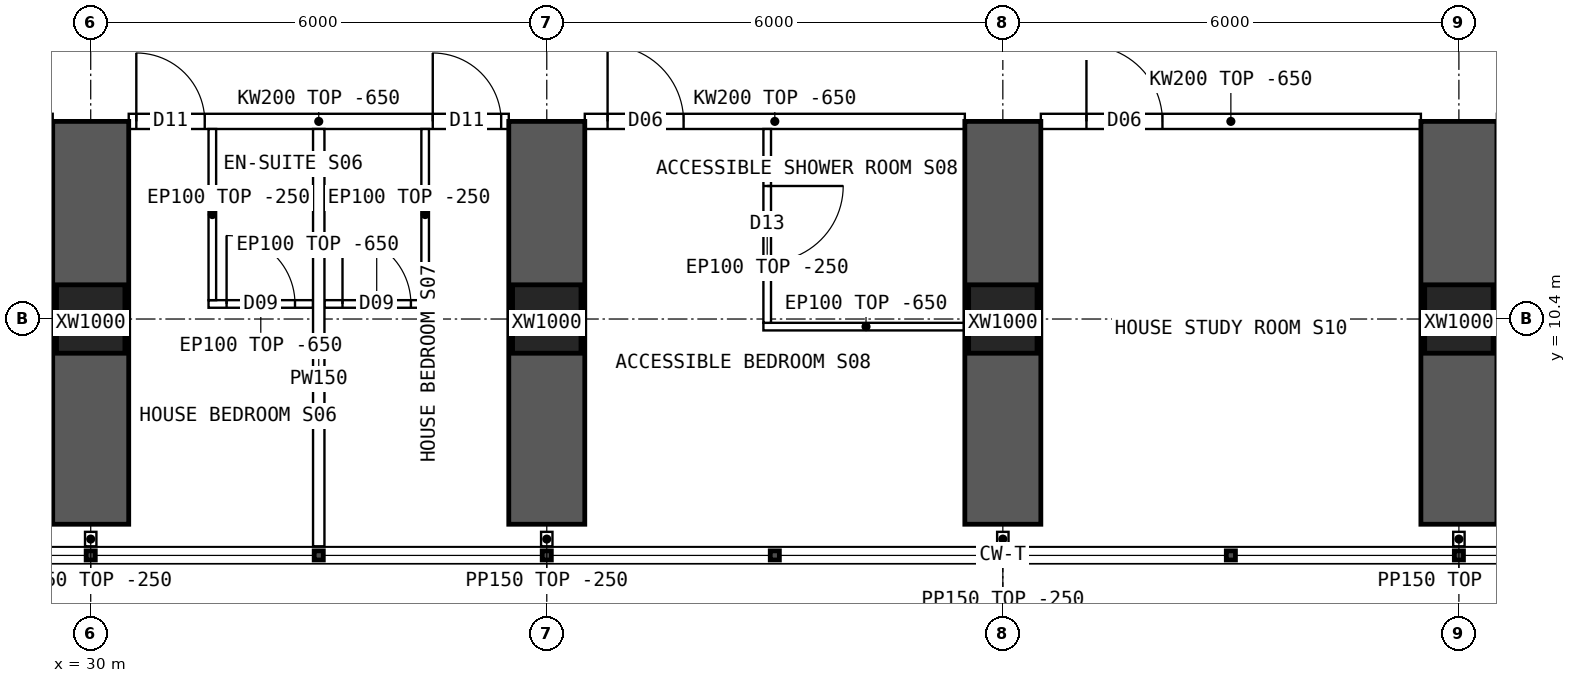
"""IFC4 building model, lengths in metres.
Left out: names, types, materials, properties, quantities, classifications, styles, units other than length and angle.
Written with IfcOpenShell. Run it as: python <this file> out.ifc"""

import sys

from ifc_helpers import new_model, si_unit, direction, frame, frame_2d, origin, origin_2d, place, context, subcontext, project, spatial, polyline, rectangle, hollow_rectangle, outline, extrude, element, fill, save


model = new_model("IFC4")
c1 = context("Model", 3, precision=1e-05, world=origin(), true_north=direction((0.0, 1.0)))
c2 = subcontext(c1, "Body", "Model", "MODEL_VIEW")
j1 = project(units=[si_unit("LENGTHUNIT", "METRE"), si_unit("PLANEANGLEUNIT", "RADIAN")], contexts=[c1])
p1 = place(None, origin())
s1 = spatial("IfcSite", under=j1, at=p1, CompositionType="ELEMENT")
p2 = place(p1, origin())
s2 = spatial("IfcBuilding", under=s1, at=p2, CompositionType="ELEMENT")
p3 = place(p2, frame((0.0, 0.0, 31.45)))
s3 = spatial("IfcBuildingStorey", under=s2, at=p3, CompositionType="ELEMENT", Elevation=31.45)
for number, where, z_axis, x_axis in (
    (1, (30.0, 10.4, 0.0), (0.0, 0.0, 1.0), (1.0, 0.0, 0.0)),
    (2, (36.0, 10.4, 0.0), (0.0, 0.0, 1.0), (1.0, 0.0, 0.0)),
    (3, (42.0, 10.4, 0.0), (0.0, 0.0, 1.0), (1.0, 0.0, 0.0)),
    (4, (48.0, 10.4, 0.0), (0.0, 0.0, 1.0), (1.0, 0.0, 0.0)),
):
    element("IfcColumn", number, at=place(p3, frame(where, z_axis=z_axis, x_axis=x_axis)), inside=s3, PredefinedType="COLUMN", context=c2, shape_type="SweptSolid", body=[
        extrude(hollow_rectangle(XDim=0.9, YDim=0.9, WallThickness=0.09, at=origin_2d()), origin(), (0.0, 0.0, 1.0), 3.75),
    ])
for number, where, z_axis, x_axis in (
    (5, (30.0, 7.7, 0.0), (0.0, 0.0, 1.0), (0.0, 1.0, 0.0)),
    (6, (36.0, 7.7, 0.0), (0.0, 0.0, 1.0), (0.0, 1.0, 0.0)),
    (7, (42.0, 7.7, 0.0), (0.0, 0.0, 1.0), (0.0, 1.0, 0.0)),
    (8, (48.0, 7.7, 0.0), (0.0, 0.0, 1.0), (0.0, 1.0, 0.0)),
):
    element("IfcWall", number, at=place(p3, frame(where, z_axis=z_axis, x_axis=x_axis)), inside=s3, PredefinedType="SHEAR", context=c2, shape_type="SweptSolid", body=[
        extrude(rectangle(XDim=5.3, YDim=1.0, at=frame_2d((2.65, 0.0))), origin(), (0.0, 0.0, 1.0), 3.75),
    ])
p4 = place(p3, frame((30.5, 13.0, 0.0), z_axis=(0.0, 0.0, 1.0), x_axis=(1.0, 0.0, 0.0)))
e9 = element("IfcWall", 9, at=p4, inside=s3, PredefinedType="SOLIDWALL", context=c2, shape_type="SweptSolid", body=[
    extrude(outline(polyline([(0.0, 0.0), (5.0, 0.0), (5.0, 3.1), (0.0, 3.1), (0.0, 0.0)])), frame((0.0, 0.1, 0.0), z_axis=(0.0, -1.0, 0.0), x_axis=(1.0, 0.0, 0.0)), (0.0, 0.0, 1.0), 0.2),
])
p5 = place(p4, frame((0.1, 0.0, 0.0)))
e10 = element("IfcOpeningElement", 10, at=p5, cuts=e9, PredefinedType="OPENING", context=c2, shape_type="SweptSolid", body=[
    extrude(rectangle(XDim=0.9, YDim=2.1, at=frame_2d((0.45, 1.05))), frame((0.0, 0.11, 0.0), z_axis=(0.0, -1.0, 0.0), x_axis=(1.0, 0.0, 0.0)), (0.0, 0.0, 1.0), 0.22),
])
p6 = place(p4, frame((4.0, 0.0, 0.0)))
e11 = element("IfcOpeningElement", 11, at=p6, cuts=e9, PredefinedType="OPENING", context=c2, shape_type="SweptSolid", body=[
    extrude(rectangle(XDim=0.9, YDim=2.1, at=frame_2d((0.45, 1.05))), frame((0.0, 0.11, 0.0), z_axis=(0.0, -1.0, 0.0), x_axis=(1.0, 0.0, 0.0)), (0.0, 0.0, 1.0), 0.22),
])
p7 = place(p3, frame((36.5, 13.0, 0.0), z_axis=(0.0, 0.0, 1.0), x_axis=(1.0, 0.0, 0.0)))
e12 = element("IfcWall", 12, at=p7, inside=s3, PredefinedType="SOLIDWALL", context=c2, shape_type="SweptSolid", body=[
    extrude(outline(polyline([(0.0, 0.0), (5.0, 0.0), (5.0, 3.1), (0.0, 3.1), (0.0, 0.0)])), frame((0.0, 0.1, 0.0), z_axis=(0.0, -1.0, 0.0), x_axis=(1.0, 0.0, 0.0)), (0.0, 0.0, 1.0), 0.2),
])
p8 = place(p7, frame((0.3, 0.0, 0.0)))
e13 = element("IfcOpeningElement", 13, at=p8, cuts=e12, PredefinedType="OPENING", context=c2, shape_type="SweptSolid", body=[
    extrude(rectangle(XDim=1.0, YDim=2.1, at=frame_2d((0.5, 1.05))), frame((0.0, 0.11, 0.0), z_axis=(0.0, -1.0, 0.0), x_axis=(1.0, 0.0, 0.0)), (0.0, 0.0, 1.0), 0.22),
])
p9 = place(p3, frame((42.5, 13.0, 0.0), z_axis=(0.0, 0.0, 1.0), x_axis=(1.0, 0.0, 0.0)))
e14 = element("IfcWall", 14, at=p9, inside=s3, PredefinedType="SOLIDWALL", context=c2, shape_type="SweptSolid", body=[
    extrude(outline(polyline([(0.0, 0.0), (5.0, 0.0), (5.0, 3.1), (0.0, 3.1), (0.0, 0.0)])), frame((0.0, 0.1, 0.0), z_axis=(0.0, -1.0, 0.0), x_axis=(1.0, 0.0, 0.0)), (0.0, 0.0, 1.0), 0.2),
])
p10 = place(p9, frame((0.6, 0.0, 0.0)))
e15 = element("IfcOpeningElement", 15, at=p10, cuts=e14, PredefinedType="OPENING", context=c2, shape_type="SweptSolid", body=[
    extrude(rectangle(XDim=1.0, YDim=2.1, at=frame_2d((0.5, 1.05))), frame((0.0, 0.11, 0.0), z_axis=(0.0, -1.0, 0.0), x_axis=(1.0, 0.0, 0.0)), (0.0, 0.0, 1.0), 0.22),
])
p11 = place(p3, frame((33.0, 7.41, 0.0), z_axis=(0.0, 0.0, 1.0), x_axis=(0.0, 1.0, 0.0)))
e16 = element("IfcWall", 16, at=p11, inside=s3, PredefinedType="PARTITIONING", context=c2, shape_type="SweptSolid", body=[
    extrude(outline(polyline([(0.0, 0.0), (5.49, 0.0), (5.49, 3.1), (5.442, 3.1), (5.44, 3.5), (3.192, 3.5), (3.19, 3.1), (2.792, 3.1), (2.79, 3.5), (0.0, 3.5), (0.0, 0.0)])), frame((0.0, 0.075, 0.0), z_axis=(0.0, -1.0, 0.0), x_axis=(1.0, 0.0, 0.0)), (0.0, 0.0, 1.0), 0.15),
])
p12 = place(p3, frame((32.925, 10.598, 0.0), z_axis=(0.0, 0.0, 1.0), x_axis=(-1.0, 0.0, 0.0)))
e17 = element("IfcWall", 17, at=p12, inside=s3, PredefinedType="PARTITIONING", context=c2, shape_type="SweptSolid", body=[
    extrude(outline(polyline([(0.0, 0.0), (1.375, 0.0), (1.375, 3.1), (0.0, 3.1), (0.0, 0.0)])), frame((0.0, 0.05, 0.0), z_axis=(0.0, -1.0, 0.0), x_axis=(1.0, 0.0, 0.0)), (0.0, 0.0, 1.0), 0.1),
])
p13 = place(p12, frame((0.238, 0.0, 0.0)))
e18 = element("IfcOpeningElement", 18, at=p13, cuts=e17, PredefinedType="OPENING", context=c2, shape_type="SweptSolid", body=[
    extrude(rectangle(XDim=0.9, YDim=2.1, at=frame_2d((0.45, 1.05))), frame((0.0, 0.06, 0.0), z_axis=(0.0, -1.0, 0.0), x_axis=(1.0, 0.0, 0.0)), (0.0, 0.0, 1.0), 0.12),
])
p14 = place(p3, frame((31.6, 10.648, 0.0), z_axis=(0.0, 0.0, 1.0), x_axis=(0.0, 1.0, 0.0)))
e19 = element("IfcWall", 19, at=p14, inside=s3, PredefinedType="PARTITIONING", context=c2, shape_type="SweptSolid", body=[
    extrude(outline(polyline([(0.0, 0.0), (2.252, 0.0), (2.252, 3.1), (2.204, 3.1), (2.202, 3.5), (0.0, 3.5), (0.0, 0.0)])), frame((0.0, 0.05, 0.0), z_axis=(0.0, -1.0, 0.0), x_axis=(1.0, 0.0, 0.0)), (0.0, 0.0, 1.0), 0.1),
])
p15 = place(p3, frame((34.45, 10.598, 0.0), z_axis=(0.0, 0.0, 1.0), x_axis=(-1.0, 0.0, 0.0)))
e20 = element("IfcWall", 20, at=p15, inside=s3, PredefinedType="PARTITIONING", context=c2, shape_type="SweptSolid", body=[
    extrude(outline(polyline([(0.0, 0.0), (1.375, 0.0), (1.375, 3.1), (0.0, 3.1), (0.0, 0.0)])), frame((0.0, 0.05, 0.0), z_axis=(0.0, -1.0, 0.0), x_axis=(1.0, 0.0, 0.0)), (0.0, 0.0, 1.0), 0.1),
])
p16 = place(p15, frame((0.238, 0.0, 0.0)))
e21 = element("IfcOpeningElement", 21, at=p16, cuts=e20, PredefinedType="OPENING", context=c2, shape_type="SweptSolid", body=[
    extrude(rectangle(XDim=0.9, YDim=2.1, at=frame_2d((0.45, 1.05))), frame((0.0, 0.06, 0.0), z_axis=(0.0, -1.0, 0.0), x_axis=(1.0, 0.0, 0.0)), (0.0, 0.0, 1.0), 0.12),
])
p17 = place(p3, frame((34.4, 10.648, 0.0), z_axis=(0.0, 0.0, 1.0), x_axis=(0.0, 1.0, 0.0)))
e22 = element("IfcWall", 22, at=p17, inside=s3, PredefinedType="PARTITIONING", context=c2, shape_type="SweptSolid", body=[
    extrude(outline(polyline([(0.0, 0.0), (2.252, 0.0), (2.252, 3.1), (2.204, 3.1), (2.202, 3.5), (0.0, 3.5), (0.0, 0.0)])), frame((0.0, 0.05, 0.0), z_axis=(0.0, -1.0, 0.0), x_axis=(1.0, 0.0, 0.0)), (0.0, 0.0, 1.0), 0.1),
])
p18 = place(p3, frame((38.85, 10.3, 0.0), z_axis=(0.0, 0.0, 1.0), x_axis=(1.0, 0.0, 0.0)))
e23 = element("IfcWall", 23, at=p18, inside=s3, PredefinedType="PARTITIONING", context=c2, shape_type="SweptSolid", body=[
    extrude(outline(polyline([(0.0, 0.0), (2.7, 0.0), (2.7, 3.1), (0.0, 3.1), (0.0, 0.0)])), frame((0.0, 0.05, 0.0), z_axis=(0.0, -1.0, 0.0), x_axis=(1.0, 0.0, 0.0)), (0.0, 0.0, 1.0), 0.1),
])
p19 = place(p3, frame((38.9, 10.35, 0.0), z_axis=(0.0, 0.0, 1.0), x_axis=(0.0, 1.0, 0.0)))
e24 = element("IfcWall", 24, at=p19, inside=s3, PredefinedType="PARTITIONING", context=c2, shape_type="SweptSolid", body=[
    extrude(outline(polyline([(0.0, 0.0), (2.55, 0.0), (2.55, 3.1), (2.502, 3.1), (2.5, 3.5), (0.252, 3.5), (0.25, 3.1), (0.0, 3.1), (0.0, 0.0)])), frame((0.0, 0.05, 0.0), z_axis=(0.0, -1.0, 0.0), x_axis=(1.0, 0.0, 0.0)), (0.0, 0.0, 1.0), 0.1),
])
p20 = place(p19, frame((0.8, 0.0, 0.0)))
e25 = element("IfcOpeningElement", 25, at=p20, cuts=e24, PredefinedType="OPENING", context=c2, shape_type="SweptSolid", body=[
    extrude(rectangle(XDim=1.0, YDim=2.1, at=frame_2d((0.5, 1.05))), frame((0.0, 0.06, 0.0), z_axis=(0.0, -1.0, 0.0), x_axis=(1.0, 0.0, 0.0)), (0.0, 0.0, 1.0), 0.12),
])
for number, where, z_axis, x_axis in (
    (26, (30.0, 7.6, 0.0), (0.0, 0.0, 1.0), (0.0, -1.0, 0.0)),
    (27, (36.0, 7.6, 0.0), (0.0, 0.0, 1.0), (0.0, -1.0, 0.0)),
    (28, (42.0, 7.6, 0.0), (0.0, 0.0, 1.0), (0.0, -1.0, 0.0)),
    (29, (48.0, 7.6, 0.0), (0.0, 0.0, 1.0), (0.0, -1.0, 0.0)),
):
    element("IfcWall", number, at=place(p3, frame(where, z_axis=z_axis, x_axis=x_axis)), inside=s3, PredefinedType="PARTITIONING", context=c2, shape_type="SweptSolid", body=[
        extrude(rectangle(XDim=0.19, YDim=0.15, at=frame_2d((0.095, 0.0))), origin(), (0.0, 0.0, 1.0), 3.5),
    ])
p21 = place(p13, origin())
e30 = element("IfcDoor", 30, at=p21, inside=s3, OperationType="SINGLE_SWING_RIGHT", PredefinedType="DOOR", context=c2, shape_type="SweptSolid", body=[
    extrude(rectangle(XDim=0.9, YDim=2.1, at=frame_2d((0.45, 1.05))), frame((0.0, 0.025, 0.0), z_axis=(0.0, -1.0, 0.0), x_axis=(1.0, 0.0, 0.0)), (0.0, 0.0, 1.0), 0.05),
])
fill(e18, e30)
p22 = place(p5, origin())
e31 = element("IfcDoor", 31, at=p22, inside=s3, OperationType="SINGLE_SWING_LEFT", PredefinedType="DOOR", context=c2, shape_type="SweptSolid", body=[
    extrude(rectangle(XDim=0.9, YDim=2.1, at=frame_2d((0.45, 1.05))), frame((0.0, 0.025, 0.0), z_axis=(0.0, -1.0, 0.0), x_axis=(1.0, 0.0, 0.0)), (0.0, 0.0, 1.0), 0.05),
])
fill(e10, e31)
p23 = place(p16, origin())
e32 = element("IfcDoor", 32, at=p23, inside=s3, OperationType="SINGLE_SWING_RIGHT", PredefinedType="DOOR", context=c2, shape_type="SweptSolid", body=[
    extrude(rectangle(XDim=0.9, YDim=2.1, at=frame_2d((0.45, 1.05))), frame((0.0, 0.025, 0.0), z_axis=(0.0, -1.0, 0.0), x_axis=(1.0, 0.0, 0.0)), (0.0, 0.0, 1.0), 0.05),
])
fill(e21, e32)
p24 = place(p6, origin())
e33 = element("IfcDoor", 33, at=p24, inside=s3, OperationType="SINGLE_SWING_LEFT", PredefinedType="DOOR", context=c2, shape_type="SweptSolid", body=[
    extrude(rectangle(XDim=0.9, YDim=2.1, at=frame_2d((0.45, 1.05))), frame((0.0, 0.025, 0.0), z_axis=(0.0, -1.0, 0.0), x_axis=(1.0, 0.0, 0.0)), (0.0, 0.0, 1.0), 0.05),
])
fill(e11, e33)
p25 = place(p20, origin())
e34 = element("IfcDoor", 34, at=p25, inside=s3, OperationType="SINGLE_SWING_RIGHT", PredefinedType="DOOR", context=c2, shape_type="SweptSolid", body=[
    extrude(rectangle(XDim=1.0, YDim=2.1, at=frame_2d((0.5, 1.05))), frame((0.0, 0.025, 0.0), z_axis=(0.0, -1.0, 0.0), x_axis=(1.0, 0.0, 0.0)), (0.0, 0.0, 1.0), 0.05),
])
fill(e25, e34)
p26 = place(p8, origin())
e35 = element("IfcDoor", 35, at=p26, inside=s3, OperationType="SINGLE_SWING_LEFT", PredefinedType="DOOR", context=c2, shape_type="SweptSolid", body=[
    extrude(rectangle(XDim=1.0, YDim=2.1, at=frame_2d((0.5, 1.05))), frame((0.0, 0.025, 0.0), z_axis=(0.0, -1.0, 0.0), x_axis=(1.0, 0.0, 0.0)), (0.0, 0.0, 1.0), 0.05),
])
fill(e13, e35)
p27 = place(p10, origin())
e36 = element("IfcDoor", 36, at=p27, inside=s3, OperationType="SINGLE_SWING_LEFT", PredefinedType="DOOR", context=c2, shape_type="SweptSolid", body=[
    extrude(rectangle(XDim=1.0, YDim=2.1, at=frame_2d((0.5, 1.05))), frame((0.0, 0.025, 0.0), z_axis=(0.0, -1.0, 0.0), x_axis=(1.0, 0.0, 0.0)), (0.0, 0.0, 1.0), 0.05),
])
fill(e15, e36)
save(model, sys.argv[1])
